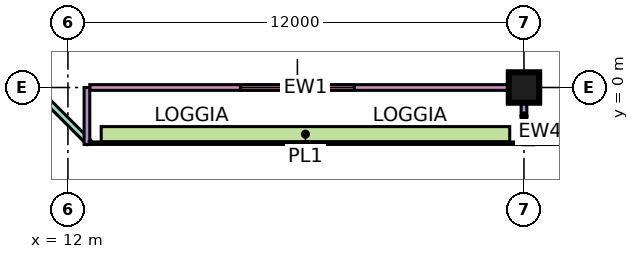
"""IFC4 building model, lengths in metres.
Left out: names, types, materials, properties, quantities, classifications, styles, units other than length and angle.
Written with IfcOpenShell. Run it as: python <this file> out.ifc"""

import sys

from ifc_helpers import new_model, si_unit, direction, frame, frame_2d, origin, origin_2d, place, context, subcontext, project, spatial, rectangle, extrude, element, fill, save


model = new_model("IFC4")
c1 = context("Model", 3, precision=1e-05, world=origin(), true_north=direction((0.0, 1.0)))
c2 = subcontext(c1, "Body", "Model", "MODEL_VIEW")
j1 = project(units=[si_unit("LENGTHUNIT", "METRE"), si_unit("PLANEANGLEUNIT", "RADIAN")], contexts=[c1])
p1 = place(None, origin())
s1 = spatial("IfcSite", under=j1, at=p1, CompositionType="ELEMENT")
p2 = place(p1, origin())
s2 = spatial("IfcBuilding", under=s1, at=p2, CompositionType="ELEMENT")
p3 = place(p2, frame((0.0, 0.0, 327.65)))
s3 = spatial("IfcBuildingStorey", under=s2, at=p3, CompositionType="ELEMENT", Elevation=327.65)
p4 = place(p3, frame((24.0, 0.0, 0.0), z_axis=(0.0, 0.0, 1.0), x_axis=(1.0, 0.0, 0.0)))
e1 = element("IfcColumn", 1, at=p4, inside=s3, PredefinedType="COLUMN", context=c2, shape_type="SweptSolid", body=[
    extrude(rectangle(XDim=0.8, YDim=0.8, at=origin_2d()), origin(), (0.0, 0.0, 1.0), 11.25),
])
p5 = place(p3, frame((-1.447, 12.553, 0.0), z_axis=(0.0, 0.0, 1.0), x_axis=(0.707106781187, -0.707106781187, 0.0)))
e2 = element("IfcWall", 2, at=p5, inside=s3, PredefinedType="SOLIDWALL", context=c2, shape_type="SweptSolid", body=[
    extrude(rectangle(XDim=19.799, YDim=0.15, at=frame_2d((9.899, 0.0))), origin(), (0.0, 0.0, 1.0), 10.85),
])
p6 = place(p5, frame((8.399, 0.0, 0.45)))
e3 = element("IfcOpeningElement", 3, at=p6, cuts=e2, PredefinedType="OPENING", context=c2, shape_type="SweptSolid", body=[
    extrude(rectangle(XDim=3.0, YDim=9.8, at=frame_2d((1.5, 4.9))), frame((0.0, 0.085, 0.0), z_axis=(0.0, -1.0, 0.0), x_axis=(1.0, 0.0, 0.0)), (0.0, 0.0, 1.0), 0.17),
])
p7 = place(p3, frame((12.575, 0.0, 0.0), z_axis=(0.0, 0.0, 1.0), x_axis=(1.0, 0.0, 0.0)))
e4 = element("IfcWall", 4, at=p7, inside=s3, PredefinedType="SOLIDWALL", context=c2, shape_type="SweptSolid", body=[
    extrude(rectangle(XDim=11.35, YDim=0.15, at=frame_2d((5.675, 0.0))), origin(), (0.0, 0.0, 1.0), 10.85),
])
p8 = place(p7, frame((3.962, 0.0, 0.45)))
e5 = element("IfcOpeningElement", 5, at=p8, cuts=e4, PredefinedType="OPENING", context=c2, shape_type="SweptSolid", body=[
    extrude(rectangle(XDim=3.0, YDim=9.8, at=frame_2d((1.5, 4.9))), frame((0.0, 0.085, 0.0), z_axis=(0.0, -1.0, 0.0), x_axis=(1.0, 0.0, 0.0)), (0.0, 0.0, 1.0), 0.17),
])
for number, where, z_axis, x_axis in (
    (6, (12.5, -1.5, 0.0), (0.0, 0.0, 1.0), (0.0, 1.0, 0.0)),
    (7, (24.0, -1.5, 0.0), (0.0, 0.0, 1.0), (0.0, 1.0, 0.0)),
):
    element("IfcWall", number, at=place(p3, frame(where, z_axis=z_axis, x_axis=x_axis)), inside=s3, PredefinedType="SOLIDWALL", context=c2, shape_type="SweptSolid", body=[
        extrude(rectangle(XDim=1.5, YDim=0.15, at=frame_2d((0.75, 0.0))), origin(), (0.0, 0.0, 1.0), 10.85),
    ])
p9 = place(p3, frame((12.875, -1.229, 0.0), z_axis=(0.0, 0.0, 1.0), x_axis=(1.0, 0.0, 0.0)))
e8 = element("IfcWall", 8, at=p9, inside=s3, PredefinedType="SOLIDWALL", context=c2, shape_type="SweptSolid", body=[
    extrude(rectangle(XDim=10.75, YDim=0.4, at=frame_2d((5.375, 0.0))), origin(), (0.0, 0.0, 1.0), 0.7),
])
p10 = place(p8, origin())
e9 = element("IfcWindow", 9, at=p10, inside=s3, PartitioningType="SINGLE_PANEL", PredefinedType="WINDOW", context=c2, shape_type="SweptSolid", body=[
    extrude(rectangle(XDim=3.0, YDim=9.8, at=frame_2d((1.5, 4.9))), frame((0.0, 0.03, 0.0), z_axis=(0.0, -1.0, 0.0), x_axis=(1.0, 0.0, 0.0)), (0.0, 0.0, 1.0), 0.06),
])
fill(e5, e9)
save(model, sys.argv[1])
